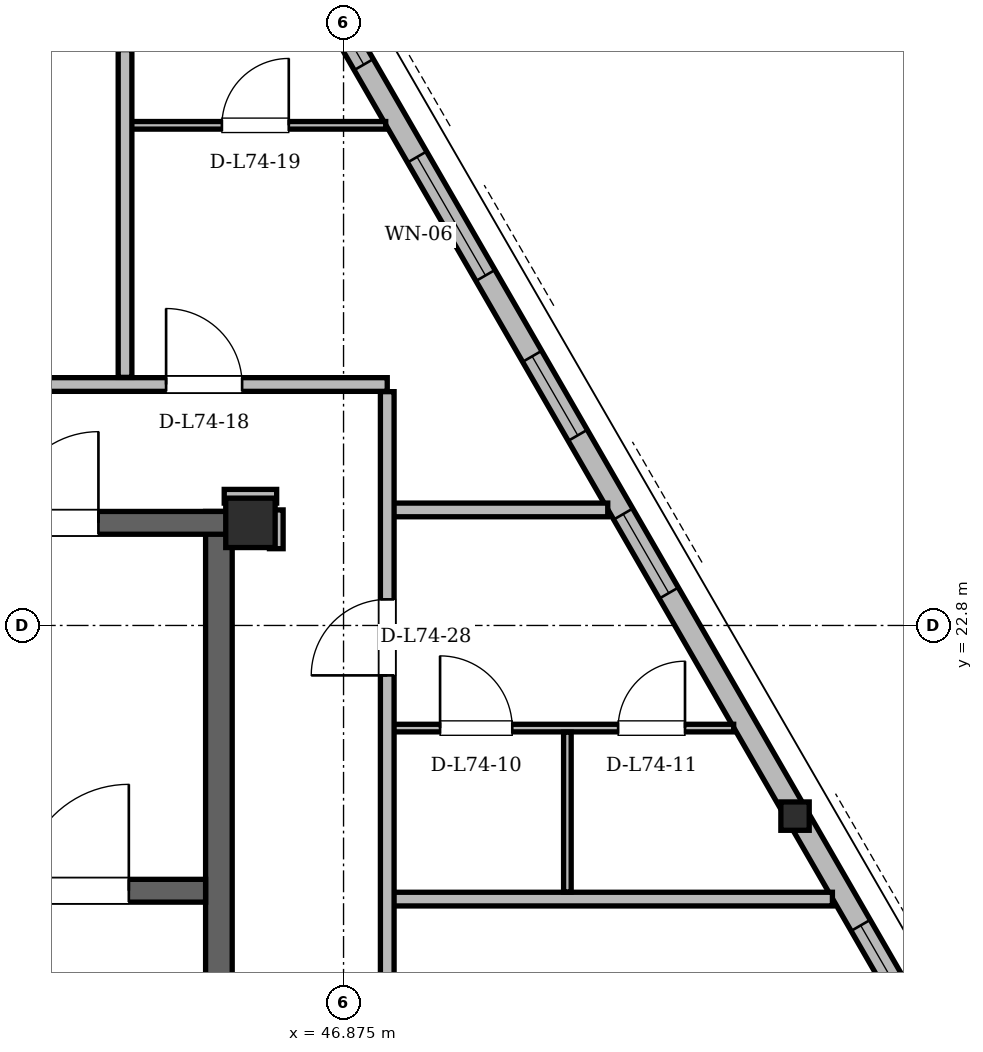
"""IFC4 building model, lengths in metres.
Left out: names, types, materials, properties, quantities, classifications, styles, units other than length and angle.
Written with IfcOpenShell. Run it as: python <this file> out.ifc"""

import sys

from ifc_helpers import new_model, si_unit, direction, frame, frame_2d, origin, origin_2d, place, context, subcontext, project, spatial, rectangle, hollow_rectangle, i_section, extrude, element, fill, save


model = new_model("IFC4")
c1 = context("Model", 3, precision=1e-05, world=origin(), true_north=direction((0.0, 1.0)))
c2 = subcontext(c1, "Body", "Model", "MODEL_VIEW")
j1 = project(units=[si_unit("LENGTHUNIT", "METRE"), si_unit("PLANEANGLEUNIT", "RADIAN")], contexts=[c1])
p1 = place(None, origin())
s1 = spatial("IfcSite", under=j1, at=p1, CompositionType="ELEMENT")
p2 = place(p1, origin())
s2 = spatial("IfcBuilding", under=s1, at=p2, CompositionType="ELEMENT")
p3 = place(p2, frame((0.0, 0.0, 281.1)))
s3 = spatial("IfcBuildingStorey", under=s2, at=p3, CompositionType="ELEMENT", Elevation=281.1)
p4 = place(p3, frame((45.65, 24.15, 0.0), z_axis=(0.0, 0.0, 1.0), x_axis=(1.0, 0.0, 0.0)))
e1 = element("IfcColumn", 1, at=p4, inside=s3, PredefinedType="COLUMN", context=c2, shape_type="SweptSolid", body=[
    extrude(hollow_rectangle(XDim=0.65, YDim=0.65, WallThickness=0.05, at=origin_2d()), origin(), (0.0, 0.0, 1.0), 3.9),
])
p5 = place(p3, frame((52.838, 20.31, 0.004), z_axis=(-0.011731624298, -0.00953586574, 0.999885711597), x_axis=(0.630748834941, -0.775987053513, 0.0)))
e2 = element("IfcColumn", 2, at=p5, inside=s3, PredefinedType="COLUMN", context=c2, shape_type="SweptSolid", body=[
    extrude(i_section(OverallWidth=0.373, OverallDepth=0.373, WebThickness=0.016, FlangeThickness=0.026, at=origin_2d()), origin(), (0.0, 0.0, 1.0), 3.892),
])
p6 = place(p3, frame((45.235, 11.0, 0.0), z_axis=(0.0, 0.0, 1.0), x_axis=(0.0, 1.0, 0.0)))
e3 = element("IfcWall", 3, at=p6, inside=s3, PredefinedType="SHEAR", context=c2, shape_type="SweptSolid", body=[
    extrude(rectangle(XDim=13.3, YDim=0.35, at=frame_2d((6.65, 0.0))), origin(), (0.0, 0.0, 1.0), 3.68),
])
p7 = place(p3, frame((29.65, 24.15, 0.0), z_axis=(0.0, 0.0, 1.0), x_axis=(1.0, 0.0, 0.0)))
e4 = element("IfcWall", 4, at=p7, inside=s3, PredefinedType="SHEAR", context=c2, shape_type="SweptSolid", body=[
    extrude(rectangle(XDim=15.7, YDim=0.3, at=frame_2d((7.85, 0.0))), origin(), (0.0, 0.0, 1.0), 3.68),
])
p8 = place(p7, frame((1.7, 0.0, 0.0)))
e5 = element("IfcOpeningElement", 5, at=p8, cuts=e4, PredefinedType="OPENING", context=c2, shape_type="SweptSolid", body=[
    extrude(rectangle(XDim=1.2, YDim=2.2, at=frame_2d((0.6, 1.1))), frame((0.0, 0.15, 0.0), z_axis=(0.0, -1.0, 0.0), x_axis=(1.0, 0.0, 0.0)), (0.0, 0.0, 1.0), 0.3),
])
p9 = place(p7, frame((12.8, 0.0, 0.0)))
e6 = element("IfcOpeningElement", 6, at=p9, cuts=e4, PredefinedType="OPENING", context=c2, shape_type="SweptSolid", body=[
    extrude(rectangle(XDim=1.2, YDim=2.2, at=frame_2d((0.6, 1.1))), frame((0.0, 0.15, 0.0), z_axis=(0.0, -1.0, 0.0), x_axis=(1.0, 0.0, 0.0)), (0.0, 0.0, 1.0), 0.3),
])
p10 = place(p7, frame((6.55, 0.0, 0.0)))
e7 = element("IfcOpeningElement", 7, at=p10, cuts=e4, PredefinedType="OPENING", context=c2, shape_type="SweptSolid", body=[
    extrude(rectangle(XDim=0.9, YDim=2.05, at=frame_2d((0.45, 1.025))), frame((0.0, 0.15, 0.0), z_axis=(0.0, -1.0, 0.0), x_axis=(1.0, 0.0, 0.0)), (0.0, 0.0, 1.0), 0.3),
])
p11 = place(p7, frame((8.45, 0.0, 0.0)))
e8 = element("IfcOpeningElement", 8, at=p11, cuts=e4, PredefinedType="OPENING", context=c2, shape_type="SweptSolid", body=[
    extrude(rectangle(XDim=0.9, YDim=2.05, at=frame_2d((0.45, 1.025))), frame((0.0, 0.15, 0.0), z_axis=(0.0, -1.0, 0.0), x_axis=(1.0, 0.0, 0.0)), (0.0, 0.0, 1.0), 0.3),
])
p12 = place(p3, frame((41.05, 19.31, 0.0), z_axis=(0.0, 0.0, 1.0), x_axis=(1.0, 0.0, 0.0)))
e9 = element("IfcWall", 9, at=p12, inside=s3, PredefinedType="SHEAR", context=c2, shape_type="SweptSolid", body=[
    extrude(rectangle(XDim=4.01, YDim=0.3, at=frame_2d((2.005, 0.0))), origin(), (0.0, 0.0, 1.0), 3.68),
])
p13 = place(p12, frame((1.6, 0.0, 0.0)))
e10 = element("IfcOpeningElement", 10, at=p13, cuts=e9, PredefinedType="OPENING", context=c2, shape_type="SweptSolid", body=[
    extrude(rectangle(XDim=1.4, YDim=2.2, at=frame_2d((0.7, 1.1))), frame((0.0, 0.15, 0.0), z_axis=(0.0, -1.0, 0.0), x_axis=(1.0, 0.0, 0.0)), (0.0, 0.0, 1.0), 0.3),
])
p14 = place(p3, frame((58.454, 10.584, 0.0), z_axis=(0.0, 0.0, 1.0), x_axis=(-0.500002460556, 0.866023983177, 0.0)))
e11 = element("IfcWall", 11, at=p14, inside=s3, PredefinedType="SOLIDWALL", context=c2, shape_type="SweptSolid", body=[
    extrude(rectangle(XDim=37.435, YDim=0.29, at=frame_2d((18.718, 0.0))), origin(), (0.0, 0.0, 1.0), 3.058),
])
p15 = place(p14, frame((3.639, 0.0, 0.0)))
e12 = element("IfcOpeningElement", 12, at=p15, cuts=e11, PredefinedType="OPENING", context=c2, shape_type="SweptSolid", body=[
    extrude(rectangle(XDim=1.5, YDim=2.2, at=frame_2d((0.75, 1.1))), frame((0.0, 0.145, 0.0), z_axis=(0.0, -1.0, 0.0), x_axis=(1.0, 0.0, 0.0)), (0.0, 0.0, 1.0), 0.29),
])
p16 = place(p14, frame((27.901, 0.0, 0.0)))
e13 = element("IfcOpeningElement", 13, at=p16, cuts=e11, PredefinedType="OPENING", context=c2, shape_type="SweptSolid", body=[
    extrude(rectangle(XDim=1.5, YDim=2.2, at=frame_2d((0.75, 1.1))), frame((0.0, 0.145, 0.0), z_axis=(0.0, -1.0, 0.0), x_axis=(1.0, 0.0, 0.0)), (0.0, 0.0, 1.0), 0.29),
])
p17 = place(p14, frame((0.782, 0.0, 0.85)))
e14 = element("IfcOpeningElement", 14, at=p17, cuts=e11, PredefinedType="OPENING", context=c2, shape_type="SweptSolid", body=[
    extrude(rectangle(XDim=1.2, YDim=1.48, at=frame_2d((0.6, 0.74))), frame((0.0, 0.145, 0.0), z_axis=(0.0, -1.0, 0.0), x_axis=(1.0, 0.0, 0.0)), (0.0, 0.0, 1.0), 0.29),
])
p18 = place(p14, frame((7.149, 0.0, 0.85)))
e15 = element("IfcOpeningElement", 15, at=p18, cuts=e11, PredefinedType="OPENING", context=c2, shape_type="SweptSolid", body=[
    extrude(rectangle(XDim=2.4, YDim=1.9, at=frame_2d((1.2, 0.95))), frame((0.0, 0.145, 0.0), z_axis=(0.0, -1.0, 0.0), x_axis=(1.0, 0.0, 0.0)), (0.0, 0.0, 1.0), 0.29),
])
p19 = place(p14, frame((35.38, 0.0, 0.85)))
e16 = element("IfcOpeningElement", 16, at=p19, cuts=e11, PredefinedType="OPENING", context=c2, shape_type="SweptSolid", body=[
    extrude(rectangle(XDim=1.2, YDim=1.48, at=frame_2d((0.6, 0.74))), frame((0.0, 0.145, 0.0), z_axis=(0.0, -1.0, 0.0), x_axis=(1.0, 0.0, 0.0)), (0.0, 0.0, 1.0), 0.29),
])
p20 = place(p14, frame((16.994, 0.0, 0.85)))
e17 = element("IfcOpeningElement", 17, at=p20, cuts=e11, PredefinedType="OPENING", context=c2, shape_type="SweptSolid", body=[
    extrude(rectangle(XDim=1.2, YDim=1.48, at=frame_2d((0.6, 0.74))), frame((0.0, 0.145, 0.0), z_axis=(0.0, -1.0, 0.0), x_axis=(1.0, 0.0, 0.0)), (0.0, 0.0, 1.0), 0.29),
])
p21 = place(p14, frame((19.423, 0.0, 0.85)))
e18 = element("IfcOpeningElement", 18, at=p21, cuts=e11, PredefinedType="OPENING", context=c2, shape_type="SweptSolid", body=[
    extrude(rectangle(XDim=1.8, YDim=1.75, at=frame_2d((0.9, 0.875))), frame((0.0, 0.145, 0.0), z_axis=(0.0, -1.0, 0.0), x_axis=(1.0, 0.0, 0.0)), (0.0, 0.0, 1.0), 0.29),
])
p22 = place(p14, frame((22.626, 0.0, 0.85)))
e19 = element("IfcOpeningElement", 19, at=p22, cuts=e11, PredefinedType="OPENING", context=c2, shape_type="SweptSolid", body=[
    extrude(rectangle(XDim=2.2, YDim=1.85, at=frame_2d((1.1, 0.925))), frame((0.0, 0.145, 0.0), z_axis=(0.0, -1.0, 0.0), x_axis=(1.0, 0.0, 0.0)), (0.0, 0.0, 1.0), 0.29),
])
p23 = place(p14, frame((14.598, 0.0, 0.85)))
e20 = element("IfcOpeningElement", 20, at=p23, cuts=e11, PredefinedType="OPENING", context=c2, shape_type="SweptSolid", body=[
    extrude(rectangle(XDim=1.2, YDim=1.48, at=frame_2d((0.6, 0.74))), frame((0.0, 0.145, 0.0), z_axis=(0.0, -1.0, 0.0), x_axis=(1.0, 0.0, 0.0)), (0.0, 0.0, 1.0), 0.29),
])
p24 = place(p3, frame((47.45, 19.2, 0.0), z_axis=(0.0, 0.0, 1.0), x_axis=(1.0, 0.0, 0.0)))
e21 = element("IfcWall", 21, at=p24, inside=s3, PredefinedType="PARTITIONING", context=c2, shape_type="SweptSolid", body=[
    extrude(rectangle(XDim=5.857, YDim=0.18, at=frame_2d((2.929, 0.0))), origin(), (0.0, 0.0, 1.0), 3.68),
])
p25 = place(p3, frame((47.4, 21.45, 0.0), z_axis=(0.0, 0.0, 1.0), x_axis=(1.0, 0.0, 0.0)))
e22 = element("IfcWall", 22, at=p25, inside=s3, PredefinedType="PARTITIONING", context=c2, shape_type="SweptSolid", body=[
    extrude(rectangle(XDim=4.608, YDim=0.1, at=frame_2d((2.304, 0.0))), origin(), (0.0, 0.0, 1.0), 3.68),
])
p26 = place(p25, frame((0.745, 0.0, 0.0)))
e23 = element("IfcOpeningElement", 23, at=p26, cuts=e22, PredefinedType="OPENING", context=c2, shape_type="SweptSolid", body=[
    extrude(rectangle(XDim=0.95, YDim=2.1, at=frame_2d((0.475, 1.05))), frame((0.0, 0.05, 0.0), z_axis=(0.0, -1.0, 0.0), x_axis=(1.0, 0.0, 0.0)), (0.0, 0.0, 1.0), 0.1),
])
p27 = place(p25, frame((3.088, 0.0, 0.0)))
e24 = element("IfcOpeningElement", 24, at=p27, cuts=e22, PredefinedType="OPENING", context=c2, shape_type="SweptSolid", body=[
    extrude(rectangle(XDim=0.88, YDim=2.08, at=frame_2d((0.44, 1.04))), frame((0.0, 0.05, 0.0), z_axis=(0.0, -1.0, 0.0), x_axis=(1.0, 0.0, 0.0)), (0.0, 0.0, 1.0), 0.1),
])
p28 = place(p3, frame((47.45, 24.32, 0.0), z_axis=(0.0, 0.0, 1.0), x_axis=(1.0, 0.0, 0.0)))
e25 = element("IfcWall", 25, at=p28, inside=s3, PredefinedType="PARTITIONING", context=c2, shape_type="SweptSolid", body=[
    extrude(rectangle(XDim=2.901, YDim=0.18, at=frame_2d((1.451, 0.0))), origin(), (0.0, 0.0, 1.0), 3.68),
])
p29 = place(p3, frame((45.305, 24.5, 0.0), z_axis=(0.0, 0.0, 1.0), x_axis=(1.0, 0.0, 0.0)))
e26 = element("IfcWall", 26, at=p29, inside=s3, PredefinedType="PARTITIONING", context=c2, shape_type="SweptSolid", body=[
    extrude(rectangle(XDim=0.69, YDim=0.18, at=frame_2d((0.345, 0.0))), origin(), (0.0, 0.0, 1.0), 3.266),
])
p30 = place(p3, frame((25.603, 25.97, 0.0), z_axis=(0.0, 0.0, 1.0), x_axis=(1.0, 0.0, 0.0)))
e27 = element("IfcWall", 27, at=p30, inside=s3, PredefinedType="PARTITIONING", context=c2, shape_type="SweptSolid", body=[
    extrude(rectangle(XDim=21.847, YDim=0.18, at=frame_2d((10.924, 0.0))), origin(), (0.0, 0.0, 1.0), 3.266),
])
p31 = place(p30, frame((7.452, 0.0, 0.0)))
e28 = element("IfcOpeningElement", 28, at=p31, cuts=e27, PredefinedType="OPENING", context=c2, shape_type="SweptSolid", body=[
    extrude(rectangle(XDim=1.0, YDim=2.18, at=frame_2d((0.5, 1.09))), frame((0.0, 0.09, 0.0), z_axis=(0.0, -1.0, 0.0), x_axis=(1.0, 0.0, 0.0)), (0.0, 0.0, 1.0), 0.18),
])
p32 = place(p30, frame((15.347, 0.0, 0.0)))
e29 = element("IfcOpeningElement", 29, at=p32, cuts=e27, PredefinedType="OPENING", context=c2, shape_type="SweptSolid", body=[
    extrude(rectangle(XDim=1.3, YDim=2.2, at=frame_2d((0.65, 1.1))), frame((0.0, 0.09, 0.0), z_axis=(0.0, -1.0, 0.0), x_axis=(1.0, 0.0, 0.0)), (0.0, 0.0, 1.0), 0.18),
])
p33 = place(p30, frame((18.938, 0.0, 0.0)))
e30 = element("IfcOpeningElement", 30, at=p33, cuts=e27, PredefinedType="OPENING", context=c2, shape_type="SweptSolid", body=[
    extrude(rectangle(XDim=1.0, YDim=2.18, at=frame_2d((0.5, 1.09))), frame((0.0, 0.09, 0.0), z_axis=(0.0, -1.0, 0.0), x_axis=(1.0, 0.0, 0.0)), (0.0, 0.0, 1.0), 0.18),
])
p34 = place(p3, frame((43.918, 29.38, 0.0), z_axis=(0.0, 0.0, 1.0), x_axis=(1.0, 0.0, 0.0)))
e31 = element("IfcWall", 31, at=p34, inside=s3, PredefinedType="PARTITIONING", context=c2, shape_type="SweptSolid", body=[
    extrude(rectangle(XDim=3.512, YDim=0.1, at=frame_2d((1.756, 0.0))), origin(), (0.0, 0.0, 1.0), 3.68),
])
p35 = place(p34, frame((1.356, 0.0, 0.0)))
e32 = element("IfcOpeningElement", 32, at=p35, cuts=e31, PredefinedType="OPENING", context=c2, shape_type="SweptSolid", body=[
    extrude(rectangle(XDim=0.88, YDim=2.08, at=frame_2d((0.44, 1.04))), frame((0.0, 0.05, 0.0), z_axis=(0.0, -1.0, 0.0), x_axis=(1.0, 0.0, 0.0)), (0.0, 0.0, 1.0), 0.1),
])
p36 = place(p3, frame((44.0, 26.064, 0.0), z_axis=(0.0, 0.0, 1.0), x_axis=(0.0, 1.0, 0.0)))
e33 = element("IfcWall", 33, at=p36, inside=s3, PredefinedType="PARTITIONING", context=c2, shape_type="SweptSolid", body=[
    extrude(rectangle(XDim=4.312, YDim=0.18, at=frame_2d((2.156, 0.0))), origin(), (0.0, 0.0, 1.0), 3.266),
])
p37 = place(p3, frame((45.99, 23.81, 0.0), z_axis=(0.0, 0.0, 1.0), x_axis=(0.0, 1.0, 0.0)))
e34 = element("IfcWall", 34, at=p37, inside=s3, PredefinedType="PARTITIONING", context=c2, shape_type="SweptSolid", body=[
    extrude(rectangle(XDim=0.51, YDim=0.18, at=frame_2d((0.255, 0.0))), origin(), (0.0, 0.0, 1.0), 3.68),
])
p38 = place(p3, frame((47.45, 9.394, 0.0), z_axis=(0.0, 0.0, 1.0), x_axis=(0.0, 1.0, 0.0)))
e35 = element("IfcWall", 35, at=p38, inside=s3, PredefinedType="PARTITIONING", context=c2, shape_type="SweptSolid", body=[
    extrude(rectangle(XDim=16.482, YDim=0.18, at=frame_2d((8.241, 0.0))), origin(), (0.0, 0.0, 1.0), 3.266),
])
p39 = place(p38, frame((6.188, 0.0, 0.0)))
e36 = element("IfcOpeningElement", 36, at=p39, cuts=e35, PredefinedType="OPENING", context=c2, shape_type="SweptSolid", body=[
    extrude(rectangle(XDim=1.0, YDim=2.18, at=frame_2d((0.5, 1.09))), frame((0.0, 0.09, 0.0), z_axis=(0.0, -1.0, 0.0), x_axis=(1.0, 0.0, 0.0)), (0.0, 0.0, 1.0), 0.18),
])
p40 = place(p38, frame((12.749, 0.0, 0.0)))
e37 = element("IfcOpeningElement", 37, at=p40, cuts=e35, PredefinedType="OPENING", context=c2, shape_type="SweptSolid", body=[
    extrude(rectangle(XDim=1.0, YDim=2.18, at=frame_2d((0.5, 1.09))), frame((0.0, 0.09, 0.0), z_axis=(0.0, -1.0, 0.0), x_axis=(1.0, 0.0, 0.0)), (0.0, 0.0, 1.0), 0.18),
])
p41 = place(p3, frame((49.82, 19.294, 0.0), z_axis=(0.0, 0.0, 1.0), x_axis=(0.0, 1.0, 0.0)))
e38 = element("IfcWall", 38, at=p41, inside=s3, PredefinedType="PARTITIONING", context=c2, shape_type="SweptSolid", body=[
    extrude(rectangle(XDim=2.102, YDim=0.1, at=frame_2d((1.051, 0.0))), origin(), (0.0, 0.0, 1.0), 3.68),
])
p42 = place(p18, origin())
e39 = element("IfcWindow", 39, at=p42, inside=s3, PartitioningType="SINGLE_PANEL", PredefinedType="WINDOW", context=c2, shape_type="SweptSolid", body=[
    extrude(rectangle(XDim=2.4, YDim=1.9, at=frame_2d((1.2, 0.95))), frame((0.0, 0.03, 0.0), z_axis=(0.0, -1.0, 0.0), x_axis=(1.0, 0.0, 0.0)), (0.0, 0.0, 1.0), 0.06),
])
fill(e15, e39)
p43 = place(p20, origin())
e40 = element("IfcWindow", 40, at=p43, inside=s3, PartitioningType="SINGLE_PANEL", PredefinedType="WINDOW", context=c2, shape_type="SweptSolid", body=[
    extrude(rectangle(XDim=1.2, YDim=1.48, at=frame_2d((0.6, 0.74))), frame((0.0, 0.03, 0.0), z_axis=(0.0, -1.0, 0.0), x_axis=(1.0, 0.0, 0.0)), (0.0, 0.0, 1.0), 0.06),
])
fill(e17, e40)
p44 = place(p21, origin())
e41 = element("IfcWindow", 41, at=p44, inside=s3, PartitioningType="SINGLE_PANEL", PredefinedType="WINDOW", context=c2, shape_type="SweptSolid", body=[
    extrude(rectangle(XDim=1.8, YDim=1.75, at=frame_2d((0.9, 0.875))), frame((0.0, 0.03, 0.0), z_axis=(0.0, -1.0, 0.0), x_axis=(1.0, 0.0, 0.0)), (0.0, 0.0, 1.0), 0.06),
])
fill(e18, e41)
p45 = place(p22, origin())
e42 = element("IfcWindow", 42, at=p45, inside=s3, PartitioningType="SINGLE_PANEL", PredefinedType="WINDOW", context=c2, shape_type="SweptSolid", body=[
    extrude(rectangle(XDim=2.2, YDim=1.85, at=frame_2d((1.1, 0.925))), frame((0.0, 0.03, 0.0), z_axis=(0.0, -1.0, 0.0), x_axis=(1.0, 0.0, 0.0)), (0.0, 0.0, 1.0), 0.06),
])
fill(e19, e42)
p46 = place(p23, origin())
e43 = element("IfcWindow", 43, at=p46, inside=s3, PartitioningType="SINGLE_PANEL", PredefinedType="WINDOW", context=c2, shape_type="SweptSolid", body=[
    extrude(rectangle(XDim=1.2, YDim=1.48, at=frame_2d((0.6, 0.74))), frame((0.0, 0.03, 0.0), z_axis=(0.0, -1.0, 0.0), x_axis=(1.0, 0.0, 0.0)), (0.0, 0.0, 1.0), 0.06),
])
fill(e20, e43)
p47 = place(p13, origin())
e44 = element("IfcDoor", 44, at=p47, inside=s3, OperationType="SINGLE_SWING_RIGHT", PredefinedType="DOOR", context=c2, shape_type="SweptSolid", body=[
    extrude(rectangle(XDim=1.4, YDim=2.2, at=frame_2d((0.7, 1.1))), frame((0.0, 0.025, 0.0), z_axis=(0.0, -1.0, 0.0), x_axis=(1.0, 0.0, 0.0)), (0.0, 0.0, 1.0), 0.05),
])
fill(e10, e44)
p48 = place(p9, origin())
e45 = element("IfcDoor", 45, at=p48, inside=s3, OperationType="SINGLE_SWING_RIGHT", PredefinedType="DOOR", context=c2, shape_type="SweptSolid", body=[
    extrude(rectangle(XDim=1.2, YDim=2.2, at=frame_2d((0.6, 1.1))), frame((0.0, 0.025, 0.0), z_axis=(0.0, -1.0, 0.0), x_axis=(1.0, 0.0, 0.0)), (0.0, 0.0, 1.0), 0.05),
])
fill(e6, e45)
p49 = place(p26, origin())
e46 = element("IfcDoor", 46, at=p49, inside=s3, OperationType="SINGLE_SWING_LEFT", PredefinedType="DOOR", context=c2, shape_type="SweptSolid", body=[
    extrude(rectangle(XDim=0.95, YDim=2.1, at=frame_2d((0.475, 1.05))), frame((0.0, 0.025, 0.0), z_axis=(0.0, -1.0, 0.0), x_axis=(1.0, 0.0, 0.0)), (0.0, 0.0, 1.0), 0.05),
])
fill(e23, e46)
p50 = place(p27, origin())
e47 = element("IfcDoor", 47, at=p50, inside=s3, OperationType="SINGLE_SWING_RIGHT", PredefinedType="DOOR", context=c2, shape_type="SweptSolid", body=[
    extrude(rectangle(XDim=0.88, YDim=2.08, at=frame_2d((0.44, 1.04))), frame((0.0, 0.025, 0.0), z_axis=(0.0, -1.0, 0.0), x_axis=(1.0, 0.0, 0.0)), (0.0, 0.0, 1.0), 0.05),
])
fill(e24, e47)
p51 = place(p33, origin())
e48 = element("IfcDoor", 48, at=p51, inside=s3, OperationType="SINGLE_SWING_LEFT", PredefinedType="DOOR", context=c2, shape_type="SweptSolid", body=[
    extrude(rectangle(XDim=1.0, YDim=2.18, at=frame_2d((0.5, 1.09))), frame((0.0, 0.025, 0.0), z_axis=(0.0, -1.0, 0.0), x_axis=(1.0, 0.0, 0.0)), (0.0, 0.0, 1.0), 0.05),
])
fill(e30, e48)
p52 = place(p35, origin())
e49 = element("IfcDoor", 49, at=p52, inside=s3, OperationType="SINGLE_SWING_RIGHT", PredefinedType="DOOR", context=c2, shape_type="SweptSolid", body=[
    extrude(rectangle(XDim=0.88, YDim=2.08, at=frame_2d((0.44, 1.04))), frame((0.0, 0.025, 0.0), z_axis=(0.0, -1.0, 0.0), x_axis=(1.0, 0.0, 0.0)), (0.0, 0.0, 1.0), 0.05),
])
fill(e32, e49)
p53 = place(p40, origin())
e50 = element("IfcDoor", 50, at=p53, inside=s3, OperationType="SINGLE_SWING_LEFT", PredefinedType="DOOR", context=c2, shape_type="SweptSolid", body=[
    extrude(rectangle(XDim=1.0, YDim=2.18, at=frame_2d((0.5, 1.09))), frame((0.0, 0.025, 0.0), z_axis=(0.0, -1.0, 0.0), x_axis=(1.0, 0.0, 0.0)), (0.0, 0.0, 1.0), 0.05),
])
fill(e37, e50)
save(model, sys.argv[1])
